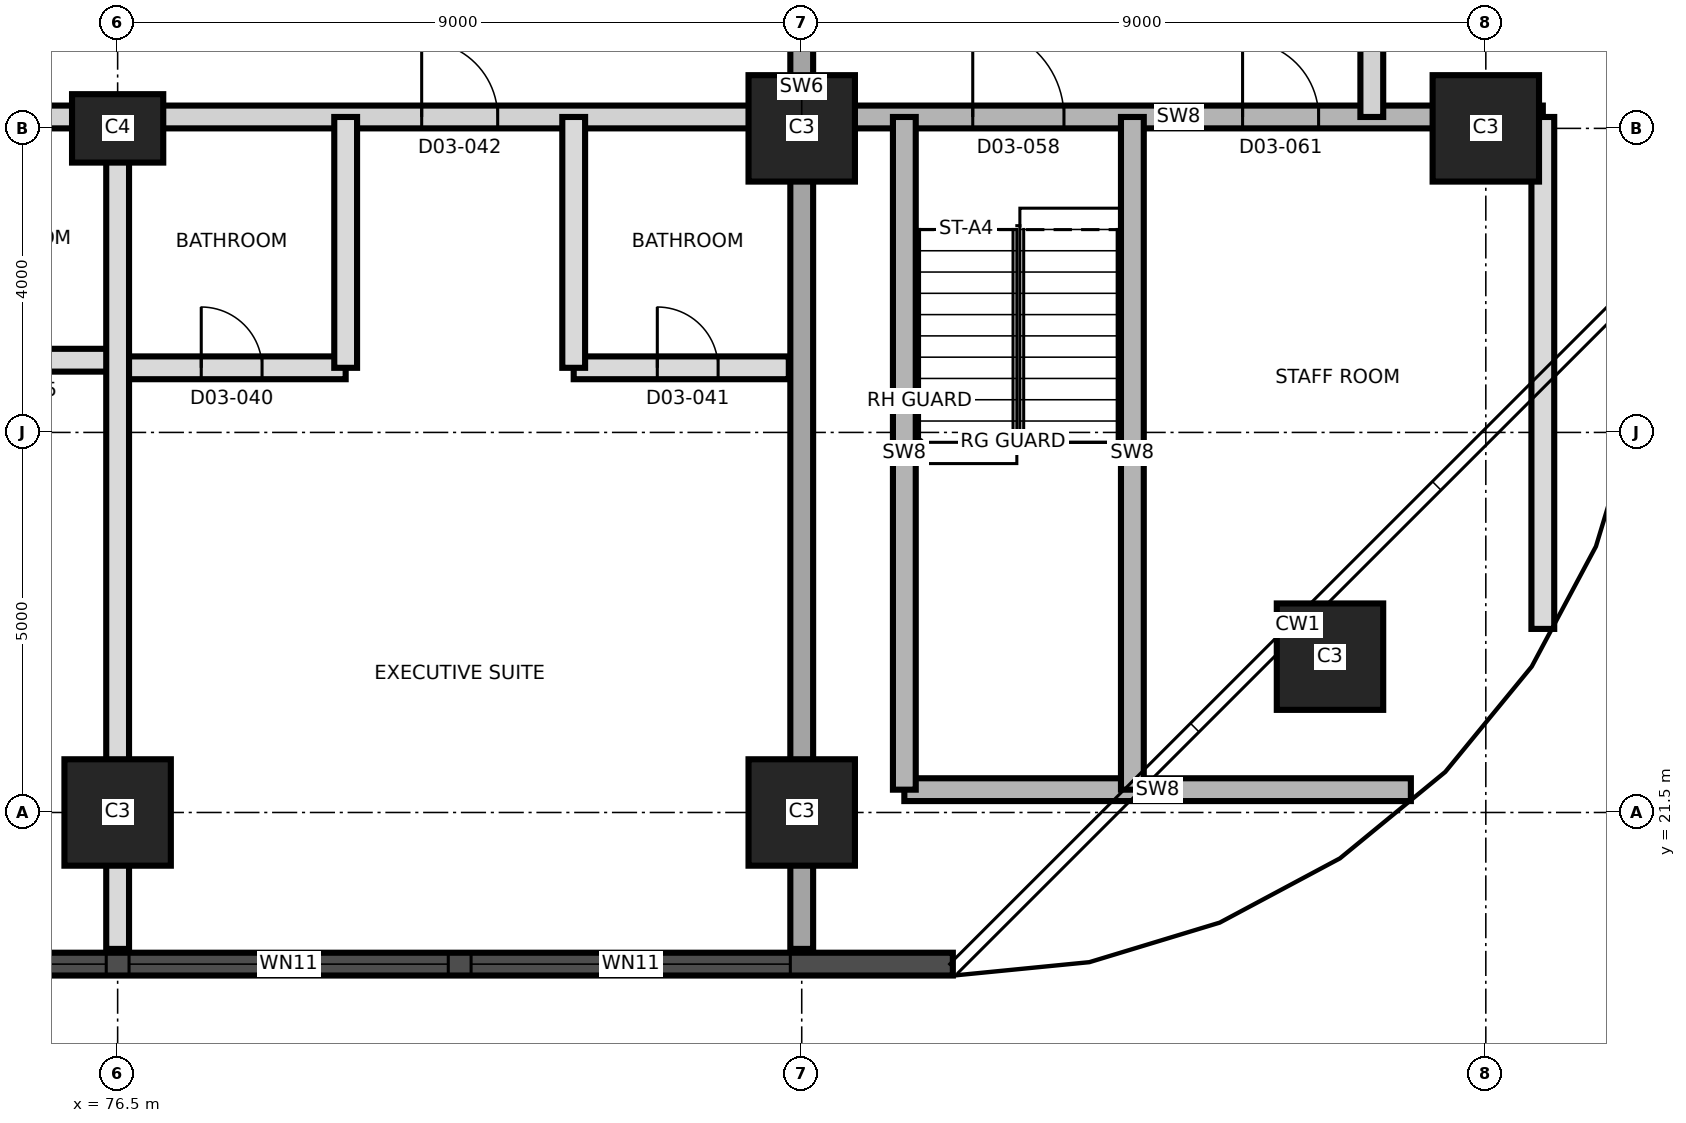
"""IFC4 building model, lengths in metres.
Left out: names, types, materials, properties, quantities, classifications, styles, units other than length and angle.
Written with IfcOpenShell. Run it as: python <this file> out.ifc"""

import sys

from ifc_helpers import new_model, si_unit, direction, frame, frame_2d, origin, origin_2d, place, context, subcontext, project, spatial, rectangle, extrude, element, fill, save


model = new_model("IFC4")
c1 = context("Model", 3, precision=1e-05, world=origin(), true_north=direction((0.0, 1.0)))
c2 = subcontext(c1, "Body", "Model", "MODEL_VIEW")
j1 = project(units=[si_unit("LENGTHUNIT", "METRE"), si_unit("PLANEANGLEUNIT", "RADIAN")], contexts=[c1])
p1 = place(None, origin())
s1 = spatial("IfcSite", under=j1, at=p1, CompositionType="ELEMENT")
p2 = place(p1, origin())
s2 = spatial("IfcBuilding", under=s1, at=p2, CompositionType="ELEMENT")
p3 = place(p2, frame((0.0, 0.0, 59.4)))
s3 = spatial("IfcBuildingStorey", under=s2, at=p3, CompositionType="ELEMENT", Elevation=59.4)
for number, where, z_axis, x_axis in (
    (1, (76.5, 21.5, 0.0), (0.0, 0.0, 1.0), (1.0, 0.0, 0.0)),
    (2, (85.5, 21.5, 0.0), (0.0, 0.0, 1.0), (1.0, 0.0, 0.0)),
    (3, (92.45, 23.55, 0.0), (0.0, 0.0, 1.0), (1.0, 0.0, 0.0)),
):
    element("IfcColumn", number, at=place(p3, frame(where, z_axis=z_axis, x_axis=x_axis)), inside=s3, PredefinedType="COLUMN", context=c2, shape_type="SweptSolid", body=[
        extrude(rectangle(XDim=1.4, YDim=1.4, at=origin_2d()), origin(), (0.0, 0.0, 1.0), 3.7),
    ])
p4 = place(p3, frame((76.5, 30.5, 0.0), z_axis=(0.0, 0.0, 1.0), x_axis=(1.0, 0.0, 0.0)))
e4 = element("IfcColumn", 4, at=p4, inside=s3, PredefinedType="COLUMN", context=c2, shape_type="SweptSolid", body=[
    extrude(rectangle(XDim=1.2, YDim=0.9, at=origin_2d()), origin(), (0.0, 0.0, 1.0), 3.7),
])
for number, where, z_axis, x_axis in (
    (5, (85.5, 30.5, 0.0), (0.0, 0.0, 1.0), (1.0, 0.0, 0.0)),
    (6, (94.5, 30.5, 0.0), (0.0, 0.0, 1.0), (1.0, 0.0, 0.0)),
):
    element("IfcColumn", number, at=place(p3, frame(where, z_axis=z_axis, x_axis=x_axis)), inside=s3, PredefinedType="COLUMN", context=c2, shape_type="SweptSolid", body=[
        extrude(rectangle(XDim=1.4, YDim=1.4, at=origin_2d()), origin(), (0.0, 0.0, 1.0), 3.7),
    ])
p5 = place(p3, frame((85.5, 19.705, 0.0), z_axis=(0.0, 0.0, 1.0), x_axis=(0.0, 1.0, 0.0)))
e7 = element("IfcWall", 7, at=p5, inside=s3, PredefinedType="SHEAR", context=c2, shape_type="SweptSolid", body=[
    extrude(rectangle(XDim=21.59, YDim=0.3, at=frame_2d((10.795, 0.0))), origin(), (0.0, 0.0, 1.0), 3.7),
])
p6 = place(p5, frame((11.995, 0.0, 0.0)))
e8 = element("IfcOpeningElement", 8, at=p6, cuts=e7, PredefinedType="OPENING", context=c2, shape_type="SweptSolid", body=[
    extrude(rectangle(XDim=1.4, YDim=2.1, at=frame_2d((0.7, 1.05))), frame((0.0, 0.16, 0.0), z_axis=(0.0, -1.0, 0.0), x_axis=(1.0, 0.0, 0.0)), (0.0, 0.0, 1.0), 0.32),
])
p7 = place(p3, frame((44.01, 19.505, 0.0), z_axis=(0.0, 0.0, 1.0), x_axis=(1.0, 0.0, 0.0)))
e9 = element("IfcWall", 9, at=p7, inside=s3, PredefinedType="SOLIDWALL", context=c2, shape_type="SweptSolid", body=[
    extrude(rectangle(XDim=43.478, YDim=0.3, at=frame_2d((21.739, 0.0))), origin(), (0.0, 0.0, 1.0), 3.4),
])
p8 = place(p7, frame((1.845, 0.0, 0.3)))
e10 = element("IfcOpeningElement", 10, at=p8, cuts=e9, PredefinedType="OPENING", context=c2, shape_type="SweptSolid", body=[
    extrude(rectangle(XDim=1.8, YDim=2.4, at=frame_2d((0.9, 1.2))), frame((0.0, 0.16, 0.0), z_axis=(0.0, -1.0, 0.0), x_axis=(1.0, 0.0, 0.0)), (0.0, 0.0, 1.0), 0.32),
])
p9 = place(p7, frame((5.64, 0.0, 0.9)))
e11 = element("IfcOpeningElement", 11, at=p9, cuts=e9, PredefinedType="OPENING", context=c2, shape_type="SweptSolid", body=[
    extrude(rectangle(XDim=4.2, YDim=1.5, at=frame_2d((2.1, 0.75))), frame((0.0, 0.16, 0.0), z_axis=(0.0, -1.0, 0.0), x_axis=(1.0, 0.0, 0.0)), (0.0, 0.0, 1.0), 0.32),
])
p10 = place(p7, frame((10.14, 0.0, 0.9)))
e12 = element("IfcOpeningElement", 12, at=p10, cuts=e9, PredefinedType="OPENING", context=c2, shape_type="SweptSolid", body=[
    extrude(rectangle(XDim=4.2, YDim=1.5, at=frame_2d((2.1, 0.75))), frame((0.0, 0.16, 0.0), z_axis=(0.0, -1.0, 0.0), x_axis=(1.0, 0.0, 0.0)), (0.0, 0.0, 1.0), 0.32),
])
p11 = place(p7, frame((14.64, 0.0, 0.9)))
e13 = element("IfcOpeningElement", 13, at=p11, cuts=e9, PredefinedType="OPENING", context=c2, shape_type="SweptSolid", body=[
    extrude(rectangle(XDim=4.2, YDim=1.5, at=frame_2d((2.1, 0.75))), frame((0.0, 0.16, 0.0), z_axis=(0.0, -1.0, 0.0), x_axis=(1.0, 0.0, 0.0)), (0.0, 0.0, 1.0), 0.32),
])
p12 = place(p7, frame((19.14, 0.0, 0.9)))
e14 = element("IfcOpeningElement", 14, at=p12, cuts=e9, PredefinedType="OPENING", context=c2, shape_type="SweptSolid", body=[
    extrude(rectangle(XDim=4.2, YDim=1.5, at=frame_2d((2.1, 0.75))), frame((0.0, 0.16, 0.0), z_axis=(0.0, -1.0, 0.0), x_axis=(1.0, 0.0, 0.0)), (0.0, 0.0, 1.0), 0.32),
])
p13 = place(p7, frame((23.64, 0.0, 0.9)))
e15 = element("IfcOpeningElement", 15, at=p13, cuts=e9, PredefinedType="OPENING", context=c2, shape_type="SweptSolid", body=[
    extrude(rectangle(XDim=4.2, YDim=1.5, at=frame_2d((2.1, 0.75))), frame((0.0, 0.16, 0.0), z_axis=(0.0, -1.0, 0.0), x_axis=(1.0, 0.0, 0.0)), (0.0, 0.0, 1.0), 0.32),
])
p14 = place(p7, frame((28.14, 0.0, 0.9)))
e16 = element("IfcOpeningElement", 16, at=p14, cuts=e9, PredefinedType="OPENING", context=c2, shape_type="SweptSolid", body=[
    extrude(rectangle(XDim=4.2, YDim=1.5, at=frame_2d((2.1, 0.75))), frame((0.0, 0.16, 0.0), z_axis=(0.0, -1.0, 0.0), x_axis=(1.0, 0.0, 0.0)), (0.0, 0.0, 1.0), 0.32),
])
p15 = place(p7, frame((32.64, 0.0, 0.9)))
e17 = element("IfcOpeningElement", 17, at=p15, cuts=e9, PredefinedType="OPENING", context=c2, shape_type="SweptSolid", body=[
    extrude(rectangle(XDim=4.2, YDim=1.5, at=frame_2d((2.1, 0.75))), frame((0.0, 0.16, 0.0), z_axis=(0.0, -1.0, 0.0), x_axis=(1.0, 0.0, 0.0)), (0.0, 0.0, 1.0), 0.32),
])
p16 = place(p7, frame((37.14, 0.0, 0.9)))
e18 = element("IfcOpeningElement", 18, at=p16, cuts=e9, PredefinedType="OPENING", context=c2, shape_type="SweptSolid", body=[
    extrude(rectangle(XDim=4.2, YDim=1.5, at=frame_2d((2.1, 0.75))), frame((0.0, 0.16, 0.0), z_axis=(0.0, -1.0, 0.0), x_axis=(1.0, 0.0, 0.0)), (0.0, 0.0, 1.0), 0.32),
])
p17 = place(p3, frame((86.85, 21.8, 0.0), z_axis=(0.0, 0.0, 1.0), x_axis=(1.0, 0.0, 0.0)))
e19 = element("IfcWall", 19, at=p17, inside=s3, PredefinedType="SHEAR", context=c2, shape_type="SweptSolid", body=[
    extrude(rectangle(XDim=6.664, YDim=0.3, at=frame_2d((3.332, 0.0))), origin(), (0.0, 0.0, 1.0), 3.4),
])
p18 = place(p3, frame((76.5, 27.35, 0.0), z_axis=(0.0, 0.0, 1.0), x_axis=(1.0, 0.0, 0.0)))
e20 = element("IfcWall", 20, at=p18, inside=s3, PredefinedType="PARTITIONING", context=c2, shape_type="SweptSolid", body=[
    extrude(rectangle(XDim=3.0, YDim=0.3, at=frame_2d((1.5, 0.0))), origin(), (0.0, 0.0, 1.0), 3.4),
])
p19 = place(p18, frame((1.1, 0.0, 0.0)))
e21 = element("IfcOpeningElement", 21, at=p19, cuts=e20, PredefinedType="OPENING", context=c2, shape_type="SweptSolid", body=[
    extrude(rectangle(XDim=0.8, YDim=2.1, at=frame_2d((0.4, 1.05))), frame((0.0, 0.16, 0.0), z_axis=(0.0, -1.0, 0.0), x_axis=(1.0, 0.0, 0.0)), (0.0, 0.0, 1.0), 0.32),
])
p20 = place(p3, frame((82.5, 27.35, 0.0), z_axis=(0.0, 0.0, 1.0), x_axis=(1.0, 0.0, 0.0)))
e22 = element("IfcWall", 22, at=p20, inside=s3, PredefinedType="PARTITIONING", context=c2, shape_type="SweptSolid", body=[
    extrude(rectangle(XDim=2.83, YDim=0.3, at=frame_2d((1.415, 0.0))), origin(), (0.0, 0.0, 1.0), 3.4),
])
p21 = place(p20, frame((1.1, 0.0, 0.0)))
e23 = element("IfcOpeningElement", 23, at=p21, cuts=e22, PredefinedType="OPENING", context=c2, shape_type="SweptSolid", body=[
    extrude(rectangle(XDim=0.8, YDim=2.1, at=frame_2d((0.4, 1.05))), frame((0.0, 0.16, 0.0), z_axis=(0.0, -1.0, 0.0), x_axis=(1.0, 0.0, 0.0)), (0.0, 0.0, 1.0), 0.32),
])
p22 = place(p3, frame((73.8, 27.45, 0.0), z_axis=(0.0, 0.0, 1.0), x_axis=(1.0, 0.0, 0.0)))
e24 = element("IfcWall", 24, at=p22, inside=s3, PredefinedType="PARTITIONING", context=c2, shape_type="SweptSolid", body=[
    extrude(rectangle(XDim=2.7, YDim=0.3, at=frame_2d((1.35, 0.0))), origin(), (0.0, 0.0, 1.0), 3.4),
])
p23 = place(p22, frame((0.95, 0.0, 0.0)))
e25 = element("IfcOpeningElement", 25, at=p23, cuts=e24, PredefinedType="OPENING", context=c2, shape_type="SweptSolid", body=[
    extrude(rectangle(XDim=0.8, YDim=2.1, at=frame_2d((0.4, 1.05))), frame((0.0, 0.16, 0.0), z_axis=(0.0, -1.0, 0.0), x_axis=(1.0, 0.0, 0.0)), (0.0, 0.0, 1.0), 0.32),
])
p24 = place(p3, frame((58.95, 30.65, 0.0), z_axis=(0.0, 0.0, 1.0), x_axis=(1.0, 0.0, 0.0)))
e26 = element("IfcWall", 26, at=p24, inside=s3, PredefinedType="PARTITIONING", context=c2, shape_type="SweptSolid", body=[
    extrude(rectangle(XDim=26.38, YDim=0.3, at=frame_2d((13.19, 0.0))), origin(), (0.0, 0.0, 1.0), 3.4),
])
p25 = place(p24, frame((0.685, 0.0, 0.0)))
e27 = element("IfcOpeningElement", 27, at=p25, cuts=e26, PredefinedType="OPENING", context=c2, shape_type="SweptSolid", body=[
    extrude(rectangle(XDim=1.2, YDim=2.1, at=frame_2d((0.6, 1.05))), frame((0.0, 0.16, 0.0), z_axis=(0.0, -1.0, 0.0), x_axis=(1.0, 0.0, 0.0)), (0.0, 0.0, 1.0), 0.32),
])
p26 = place(p24, frame((3.935, 0.0, 0.0)))
e28 = element("IfcOpeningElement", 28, at=p26, cuts=e26, PredefinedType="OPENING", context=c2, shape_type="SweptSolid", body=[
    extrude(rectangle(XDim=1.0, YDim=2.1, at=frame_2d((0.5, 1.05))), frame((0.0, 0.16, 0.0), z_axis=(0.0, -1.0, 0.0), x_axis=(1.0, 0.0, 0.0)), (0.0, 0.0, 1.0), 0.32),
])
p27 = place(p24, frame((9.685, 0.0, 0.0)))
e29 = element("IfcOpeningElement", 29, at=p27, cuts=e26, PredefinedType="OPENING", context=c2, shape_type="SweptSolid", body=[
    extrude(rectangle(XDim=1.2, YDim=2.1, at=frame_2d((0.6, 1.05))), frame((0.0, 0.16, 0.0), z_axis=(0.0, -1.0, 0.0), x_axis=(1.0, 0.0, 0.0)), (0.0, 0.0, 1.0), 0.32),
])
p28 = place(p24, frame((12.935, 0.0, 0.0)))
e30 = element("IfcOpeningElement", 30, at=p28, cuts=e26, PredefinedType="OPENING", context=c2, shape_type="SweptSolid", body=[
    extrude(rectangle(XDim=1.0, YDim=2.1, at=frame_2d((0.5, 1.05))), frame((0.0, 0.16, 0.0), z_axis=(0.0, -1.0, 0.0), x_axis=(1.0, 0.0, 0.0)), (0.0, 0.0, 1.0), 0.32),
])
p29 = place(p24, frame((21.55, 0.0, 0.0)))
e31 = element("IfcOpeningElement", 31, at=p29, cuts=e26, PredefinedType="OPENING", context=c2, shape_type="SweptSolid", body=[
    extrude(rectangle(XDim=1.0, YDim=2.4, at=frame_2d((0.5, 1.2))), frame((0.0, 0.16, 0.0), z_axis=(0.0, -1.0, 0.0), x_axis=(1.0, 0.0, 0.0)), (0.0, 0.0, 1.0), 0.32),
])
p30 = place(p3, frame((85.67, 30.65, 0.0), z_axis=(0.0, 0.0, 1.0), x_axis=(1.0, 0.0, 0.0)))
e32 = element("IfcWall", 32, at=p30, inside=s3, PredefinedType="SHEAR", context=c2, shape_type="SweptSolid", body=[
    extrude(rectangle(XDim=9.58, YDim=0.3, at=frame_2d((4.79, 0.0))), origin(), (0.0, 0.0, 1.0), 3.4),
])
p31 = place(p30, frame((2.08, 0.0, 0.0)))
e33 = element("IfcOpeningElement", 33, at=p31, cuts=e32, PredefinedType="OPENING", context=c2, shape_type="SweptSolid", body=[
    extrude(rectangle(XDim=1.2, YDim=2.1, at=frame_2d((0.6, 1.05))), frame((0.0, 0.16, 0.0), z_axis=(0.0, -1.0, 0.0), x_axis=(1.0, 0.0, 0.0)), (0.0, 0.0, 1.0), 0.32),
])
p32 = place(p30, frame((5.63, 0.0, 0.0)))
e34 = element("IfcOpeningElement", 34, at=p32, cuts=e32, PredefinedType="OPENING", context=c2, shape_type="SweptSolid", body=[
    extrude(rectangle(XDim=1.0, YDim=2.1, at=frame_2d((0.5, 1.05))), frame((0.0, 0.16, 0.0), z_axis=(0.0, -1.0, 0.0), x_axis=(1.0, 0.0, 0.0)), (0.0, 0.0, 1.0), 0.32),
])
p33 = place(p3, frame((76.5, 19.705, 0.0), z_axis=(0.0, 0.0, 1.0), x_axis=(0.0, 1.0, 0.0)))
e35 = element("IfcWall", 35, at=p33, inside=s3, PredefinedType="PARTITIONING", context=c2, shape_type="SweptSolid", body=[
    extrude(rectangle(XDim=10.945, YDim=0.3, at=frame_2d((5.472, 0.0))), origin(), (0.0, 0.0, 1.0), 3.4),
])
for number, where, z_axis, x_axis in (
    (36, (79.5, 27.35, 0.0), (0.0, 0.0, 1.0), (0.0, 1.0, 0.0)),
    (37, (82.5, 27.35, 0.0), (0.0, 0.0, 1.0), (0.0, 1.0, 0.0)),
):
    element("IfcWall", number, at=place(p3, frame(where, z_axis=z_axis, x_axis=x_axis)), inside=s3, PredefinedType="PARTITIONING", context=c2, shape_type="SweptSolid", body=[
        extrude(rectangle(XDim=3.3, YDim=0.3, at=frame_2d((1.65, 0.0))), origin(), (0.0, 0.0, 1.0), 3.4),
    ])
for number, where, z_axis, x_axis in (
    (38, (86.85, 21.8, 0.0), (0.0, 0.0, 1.0), (0.0, 1.0, 0.0)),
    (39, (89.85, 21.8, 0.0), (0.0, 0.0, 1.0), (0.0, 1.0, 0.0)),
):
    element("IfcWall", number, at=place(p3, frame(where, z_axis=z_axis, x_axis=x_axis)), inside=s3, PredefinedType="SHEAR", context=c2, shape_type="SweptSolid", body=[
        extrude(rectangle(XDim=8.85, YDim=0.3, at=frame_2d((4.425, 0.0))), origin(), (0.0, 0.0, 1.0), 3.4),
    ])
p34 = place(p3, frame((93.0, 30.65, 0.0), z_axis=(0.0, 0.0, 1.0), x_axis=(0.0, 1.0, 0.0)))
e40 = element("IfcWall", 40, at=p34, inside=s3, PredefinedType="PARTITIONING", context=c2, shape_type="SweptSolid", body=[
    extrude(rectangle(XDim=2.7, YDim=0.3, at=frame_2d((1.35, 0.0))), origin(), (0.0, 0.0, 1.0), 3.4),
])
p35 = place(p3, frame((95.25, 23.915, 0.0), z_axis=(0.0, 0.0, 1.0), x_axis=(0.0, 1.0, 0.0)))
e41 = element("IfcWall", 41, at=p35, inside=s3, PredefinedType="PARTITIONING", context=c2, shape_type="SweptSolid", body=[
    extrude(rectangle(XDim=6.735, YDim=0.3, at=frame_2d((3.367, 0.0))), origin(), (0.0, 0.0, 1.0), 3.4),
])
p36 = place(p14, origin())
e42 = element("IfcWindow", 42, at=p36, inside=s3, PartitioningType="SINGLE_PANEL", PredefinedType="WINDOW", context=c2, shape_type="SweptSolid", body=[
    extrude(rectangle(XDim=4.2, YDim=1.5, at=frame_2d((2.1, 0.75))), frame((0.0, 0.03, 0.0), z_axis=(0.0, -1.0, 0.0), x_axis=(1.0, 0.0, 0.0)), (0.0, 0.0, 1.0), 0.06),
])
fill(e16, e42)
p37 = place(p15, origin())
e43 = element("IfcWindow", 43, at=p37, inside=s3, PartitioningType="SINGLE_PANEL", PredefinedType="WINDOW", context=c2, shape_type="SweptSolid", body=[
    extrude(rectangle(XDim=4.2, YDim=1.5, at=frame_2d((2.1, 0.75))), frame((0.0, 0.03, 0.0), z_axis=(0.0, -1.0, 0.0), x_axis=(1.0, 0.0, 0.0)), (0.0, 0.0, 1.0), 0.06),
])
fill(e17, e43)
p38 = place(p16, origin())
e44 = element("IfcWindow", 44, at=p38, inside=s3, PartitioningType="SINGLE_PANEL", PredefinedType="WINDOW", context=c2, shape_type="SweptSolid", body=[
    extrude(rectangle(XDim=4.2, YDim=1.5, at=frame_2d((2.1, 0.75))), frame((0.0, 0.03, 0.0), z_axis=(0.0, -1.0, 0.0), x_axis=(1.0, 0.0, 0.0)), (0.0, 0.0, 1.0), 0.06),
])
fill(e18, e44)
p39 = place(p19, origin())
e45 = element("IfcDoor", 45, at=p39, inside=s3, OperationType="SINGLE_SWING_LEFT", PredefinedType="DOOR", context=c2, shape_type="SweptSolid", body=[
    extrude(rectangle(XDim=0.8, YDim=2.1, at=frame_2d((0.4, 1.05))), frame((0.0, 0.025, 0.0), z_axis=(0.0, -1.0, 0.0), x_axis=(1.0, 0.0, 0.0)), (0.0, 0.0, 1.0), 0.05),
])
fill(e21, e45)
p40 = place(p21, origin())
e46 = element("IfcDoor", 46, at=p40, inside=s3, OperationType="SINGLE_SWING_LEFT", PredefinedType="DOOR", context=c2, shape_type="SweptSolid", body=[
    extrude(rectangle(XDim=0.8, YDim=2.1, at=frame_2d((0.4, 1.05))), frame((0.0, 0.025, 0.0), z_axis=(0.0, -1.0, 0.0), x_axis=(1.0, 0.0, 0.0)), (0.0, 0.0, 1.0), 0.05),
])
fill(e23, e46)
p41 = place(p29, origin())
e47 = element("IfcDoor", 47, at=p41, inside=s3, OperationType="SINGLE_SWING_RIGHT", PredefinedType="DOOR", context=c2, shape_type="SweptSolid", body=[
    extrude(rectangle(XDim=1.0, YDim=2.4, at=frame_2d((0.5, 1.2))), frame((0.0, 0.025, 0.0), z_axis=(0.0, -1.0, 0.0), x_axis=(1.0, 0.0, 0.0)), (0.0, 0.0, 1.0), 0.05),
])
fill(e31, e47)
p42 = place(p31, origin())
e48 = element("IfcDoor", 48, at=p42, inside=s3, OperationType="SINGLE_SWING_LEFT", PredefinedType="DOOR", context=c2, shape_type="SweptSolid", body=[
    extrude(rectangle(XDim=1.2, YDim=2.1, at=frame_2d((0.6, 1.05))), frame((0.0, 0.025, 0.0), z_axis=(0.0, -1.0, 0.0), x_axis=(1.0, 0.0, 0.0)), (0.0, 0.0, 1.0), 0.05),
])
fill(e33, e48)
p43 = place(p32, origin())
e49 = element("IfcDoor", 49, at=p43, inside=s3, OperationType="SINGLE_SWING_LEFT", PredefinedType="DOOR", context=c2, shape_type="SweptSolid", body=[
    extrude(rectangle(XDim=1.0, YDim=2.1, at=frame_2d((0.5, 1.05))), frame((0.0, 0.025, 0.0), z_axis=(0.0, -1.0, 0.0), x_axis=(1.0, 0.0, 0.0)), (0.0, 0.0, 1.0), 0.05),
])
fill(e34, e49)
save(model, sys.argv[1])
